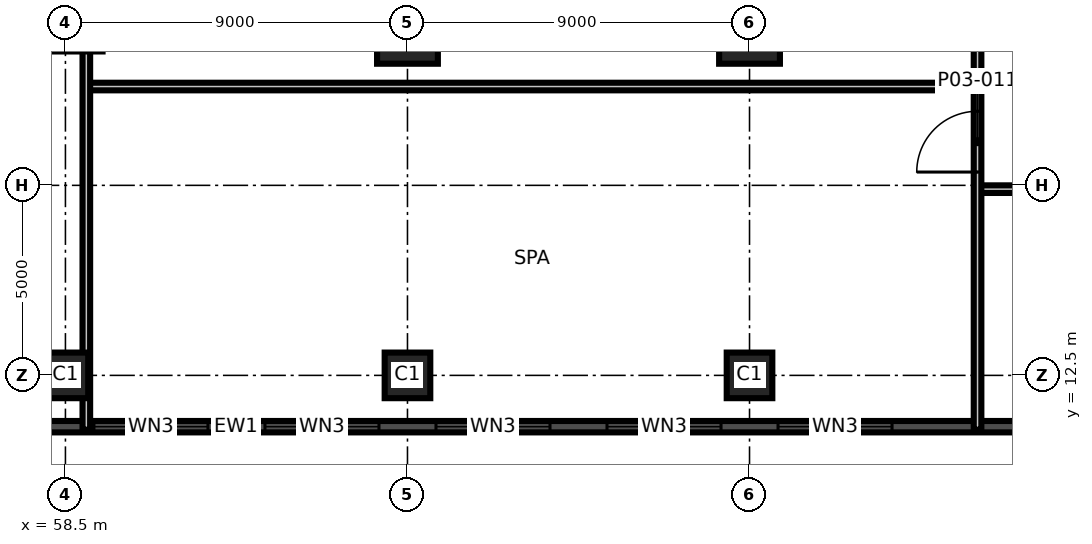
"""IFC4 building model, lengths in metres.
Left out: names, types, materials, properties, quantities, classifications, styles, units other than length and angle.
Written with IfcOpenShell. Run it as: python <this file> out.ifc"""

import sys

from ifc_helpers import new_model, si_unit, direction, frame, frame_2d, origin, origin_2d, place, context, subcontext, project, spatial, rectangle, extrude, element, fill, save


model = new_model("IFC4")
c1 = context("Model", 3, precision=1e-05, world=origin(), true_north=direction((0.0, 1.0)))
c2 = subcontext(c1, "Body", "Model", "MODEL_VIEW")
j1 = project(units=[si_unit("LENGTHUNIT", "METRE"), si_unit("PLANEANGLEUNIT", "RADIAN")], contexts=[c1])
p1 = place(None, origin())
s1 = spatial("IfcSite", under=j1, at=p1, CompositionType="ELEMENT")
p2 = place(p1, origin())
s2 = spatial("IfcBuilding", under=s1, at=p2, CompositionType="ELEMENT")
p3 = place(p2, frame((0.0, 0.0, 18.5)))
s3 = spatial("IfcBuildingStorey", under=s2, at=p3, CompositionType="ELEMENT", Elevation=18.5)
for number, where, z_axis, x_axis in (
    (1, (58.5, 12.5, 0.0), (0.0, 0.0, 1.0), (1.0, 0.0, 0.0)),
    (2, (67.5, 12.5, 0.0), (0.0, 0.0, 1.0), (1.0, 0.0, 0.0)),
    (3, (76.5, 12.5, 0.0), (0.0, 0.0, 1.0), (1.0, 0.0, 0.0)),
):
    element("IfcColumn", number, at=place(p3, frame(where, z_axis=z_axis, x_axis=x_axis)), inside=s3, PredefinedType="COLUMN", context=c2, shape_type="SweptSolid", body=[
        extrude(rectangle(XDim=1.2, YDim=1.2, at=origin_2d()), origin(), (0.0, 0.0, 1.0), 5.0),
    ])
for number, where, z_axis, x_axis in (
    (4, (67.5, 21.5, 0.0), (0.0, 0.0, 1.0), (1.0, 0.0, 0.0)),
    (5, (76.5, 21.5, 0.0), (0.0, 0.0, 1.0), (1.0, 0.0, 0.0)),
):
    element("IfcColumn", number, at=place(p3, frame(where, z_axis=z_axis, x_axis=x_axis)), inside=s3, PredefinedType="COLUMN", context=c2, shape_type="SweptSolid", body=[
        extrude(rectangle(XDim=1.6, YDim=1.6, at=origin_2d()), origin(), (0.0, 0.0, 1.0), 5.0),
    ])
p4 = place(p3, frame((27.048, 11.15, 0.0), z_axis=(0.0, 0.0, 1.0), x_axis=(1.0, 0.0, 0.0)))
e6 = element("IfcWall", 6, at=p4, inside=s3, PredefinedType="SOLIDWALL", context=c2, shape_type="SweptSolid", body=[
    extrude(rectangle(XDim=71.88, YDim=0.3, at=frame_2d((35.94, 0.0))), origin(), (0.0, 0.0, 1.0), 4.7),
])
p5 = place(p4, frame((0.726, 0.0, 0.9)))
e7 = element("IfcOpeningElement", 7, at=p5, cuts=e6, PredefinedType="OPENING", context=c2, shape_type="SweptSolid", body=[
    extrude(rectangle(XDim=3.0, YDim=2.4, at=frame_2d((1.5, 1.2))), frame((0.0, 0.16, 0.0), z_axis=(0.0, -1.0, 0.0), x_axis=(1.0, 0.0, 0.0)), (0.0, 0.0, 1.0), 0.32),
])
p6 = place(p4, frame((5.202, 0.0, 0.9)))
e8 = element("IfcOpeningElement", 8, at=p6, cuts=e6, PredefinedType="OPENING", context=c2, shape_type="SweptSolid", body=[
    extrude(rectangle(XDim=3.0, YDim=2.4, at=frame_2d((1.5, 1.2))), frame((0.0, 0.16, 0.0), z_axis=(0.0, -1.0, 0.0), x_axis=(1.0, 0.0, 0.0)), (0.0, 0.0, 1.0), 0.32),
])
p7 = place(p4, frame((9.702, 0.0, 0.9)))
e9 = element("IfcOpeningElement", 9, at=p7, cuts=e6, PredefinedType="OPENING", context=c2, shape_type="SweptSolid", body=[
    extrude(rectangle(XDim=3.0, YDim=2.4, at=frame_2d((1.5, 1.2))), frame((0.0, 0.16, 0.0), z_axis=(0.0, -1.0, 0.0), x_axis=(1.0, 0.0, 0.0)), (0.0, 0.0, 1.0), 0.32),
])
p8 = place(p4, frame((14.202, 0.0, 0.9)))
e10 = element("IfcOpeningElement", 10, at=p8, cuts=e6, PredefinedType="OPENING", context=c2, shape_type="SweptSolid", body=[
    extrude(rectangle(XDim=3.0, YDim=2.4, at=frame_2d((1.5, 1.2))), frame((0.0, 0.16, 0.0), z_axis=(0.0, -1.0, 0.0), x_axis=(1.0, 0.0, 0.0)), (0.0, 0.0, 1.0), 0.32),
])
p9 = place(p4, frame((18.702, 0.0, 0.9)))
e11 = element("IfcOpeningElement", 11, at=p9, cuts=e6, PredefinedType="OPENING", context=c2, shape_type="SweptSolid", body=[
    extrude(rectangle(XDim=3.0, YDim=2.4, at=frame_2d((1.5, 1.2))), frame((0.0, 0.16, 0.0), z_axis=(0.0, -1.0, 0.0), x_axis=(1.0, 0.0, 0.0)), (0.0, 0.0, 1.0), 0.32),
])
p10 = place(p4, frame((23.202, 0.0, 0.9)))
e12 = element("IfcOpeningElement", 12, at=p10, cuts=e6, PredefinedType="OPENING", context=c2, shape_type="SweptSolid", body=[
    extrude(rectangle(XDim=3.0, YDim=2.4, at=frame_2d((1.5, 1.2))), frame((0.0, 0.16, 0.0), z_axis=(0.0, -1.0, 0.0), x_axis=(1.0, 0.0, 0.0)), (0.0, 0.0, 1.0), 0.32),
])
p11 = place(p4, frame((27.702, 0.0, 0.9)))
e13 = element("IfcOpeningElement", 13, at=p11, cuts=e6, PredefinedType="OPENING", context=c2, shape_type="SweptSolid", body=[
    extrude(rectangle(XDim=3.0, YDim=2.4, at=frame_2d((1.5, 1.2))), frame((0.0, 0.16, 0.0), z_axis=(0.0, -1.0, 0.0), x_axis=(1.0, 0.0, 0.0)), (0.0, 0.0, 1.0), 0.32),
])
p12 = place(p4, frame((32.202, 0.0, 0.9)))
e14 = element("IfcOpeningElement", 14, at=p12, cuts=e6, PredefinedType="OPENING", context=c2, shape_type="SweptSolid", body=[
    extrude(rectangle(XDim=3.0, YDim=2.4, at=frame_2d((1.5, 1.2))), frame((0.0, 0.16, 0.0), z_axis=(0.0, -1.0, 0.0), x_axis=(1.0, 0.0, 0.0)), (0.0, 0.0, 1.0), 0.32),
])
p13 = place(p4, frame((36.702, 0.0, 0.9)))
e15 = element("IfcOpeningElement", 15, at=p13, cuts=e6, PredefinedType="OPENING", context=c2, shape_type="SweptSolid", body=[
    extrude(rectangle(XDim=3.0, YDim=2.4, at=frame_2d((1.5, 1.2))), frame((0.0, 0.16, 0.0), z_axis=(0.0, -1.0, 0.0), x_axis=(1.0, 0.0, 0.0)), (0.0, 0.0, 1.0), 0.32),
])
p14 = place(p4, frame((41.202, 0.0, 0.9)))
e16 = element("IfcOpeningElement", 16, at=p14, cuts=e6, PredefinedType="OPENING", context=c2, shape_type="SweptSolid", body=[
    extrude(rectangle(XDim=3.0, YDim=2.4, at=frame_2d((1.5, 1.2))), frame((0.0, 0.16, 0.0), z_axis=(0.0, -1.0, 0.0), x_axis=(1.0, 0.0, 0.0)), (0.0, 0.0, 1.0), 0.32),
])
p15 = place(p4, frame((45.702, 0.0, 0.9)))
e17 = element("IfcOpeningElement", 17, at=p15, cuts=e6, PredefinedType="OPENING", context=c2, shape_type="SweptSolid", body=[
    extrude(rectangle(XDim=3.0, YDim=2.4, at=frame_2d((1.5, 1.2))), frame((0.0, 0.16, 0.0), z_axis=(0.0, -1.0, 0.0), x_axis=(1.0, 0.0, 0.0)), (0.0, 0.0, 1.0), 0.32),
])
p16 = place(p4, frame((50.202, 0.0, 0.9)))
e18 = element("IfcOpeningElement", 18, at=p16, cuts=e6, PredefinedType="OPENING", context=c2, shape_type="SweptSolid", body=[
    extrude(rectangle(XDim=3.0, YDim=2.4, at=frame_2d((1.5, 1.2))), frame((0.0, 0.16, 0.0), z_axis=(0.0, -1.0, 0.0), x_axis=(1.0, 0.0, 0.0)), (0.0, 0.0, 1.0), 0.32),
])
p17 = place(p4, frame((59.202, 0.0, 0.9)))
e19 = element("IfcOpeningElement", 19, at=p17, cuts=e6, PredefinedType="OPENING", context=c2, shape_type="SweptSolid", body=[
    extrude(rectangle(XDim=3.0, YDim=2.4, at=frame_2d((1.5, 1.2))), frame((0.0, 0.16, 0.0), z_axis=(0.0, -1.0, 0.0), x_axis=(1.0, 0.0, 0.0)), (0.0, 0.0, 1.0), 0.32),
])
p18 = place(p4, frame((63.702, 0.0, 0.9)))
e20 = element("IfcOpeningElement", 20, at=p18, cuts=e6, PredefinedType="OPENING", context=c2, shape_type="SweptSolid", body=[
    extrude(rectangle(XDim=3.0, YDim=2.4, at=frame_2d((1.5, 1.2))), frame((0.0, 0.16, 0.0), z_axis=(0.0, -1.0, 0.0), x_axis=(1.0, 0.0, 0.0)), (0.0, 0.0, 1.0), 0.32),
])
p19 = place(p4, frame((68.226, 0.0, 0.9)))
e21 = element("IfcOpeningElement", 21, at=p19, cuts=e6, PredefinedType="OPENING", context=c2, shape_type="SweptSolid", body=[
    extrude(rectangle(XDim=3.0, YDim=2.4, at=frame_2d((1.5, 1.2))), frame((0.0, 0.16, 0.0), z_axis=(0.0, -1.0, 0.0), x_axis=(1.0, 0.0, 0.0)), (0.0, 0.0, 1.0), 0.32),
])
p20 = place(p3, frame((82.5, 17.4, 0.0), z_axis=(0.0, 0.0, 1.0), x_axis=(1.0, 0.0, 0.0)))
e22 = element("IfcWall", 22, at=p20, inside=s3, PredefinedType="PARTITIONING", context=c2, shape_type="SweptSolid", body=[
    extrude(rectangle(XDim=2.1, YDim=0.2, at=frame_2d((1.05, 0.0))), origin(), (0.0, 0.0, 1.0), 4.7),
])
p21 = place(p3, frame((59.05, 20.1, 0.0), z_axis=(0.0, 0.0, 1.0), x_axis=(1.0, 0.0, 0.0)))
e23 = element("IfcWall", 23, at=p21, inside=s3, PredefinedType="PARTITIONING", context=c2, shape_type="SweptSolid", body=[
    extrude(rectangle(XDim=23.45, YDim=0.2, at=frame_2d((11.725, 0.0))), origin(), (0.0, 0.0, 1.0), 4.7),
])
p22 = place(p3, frame((59.05, 11.07, 0.0), z_axis=(0.0, 0.0, 1.0), x_axis=(0.0, 1.0, 0.0)))
e24 = element("IfcWall", 24, at=p22, inside=s3, PredefinedType="PARTITIONING", context=c2, shape_type="SweptSolid", body=[
    extrude(rectangle(XDim=19.83, YDim=0.2, at=frame_2d((9.915, 0.0))), origin(), (0.0, 0.0, 1.0), 4.7),
])
p23 = place(p3, frame((82.5, 11.07, 0.0), z_axis=(0.0, 0.0, 1.0), x_axis=(0.0, 1.0, 0.0)))
e25 = element("IfcWall", 25, at=p23, inside=s3, PredefinedType="PARTITIONING", context=c2, shape_type="SweptSolid", body=[
    extrude(rectangle(XDim=19.83, YDim=0.2, at=frame_2d((9.915, 0.0))), origin(), (0.0, 0.0, 1.0), 4.7),
])
p24 = place(p23, frame((6.78, 0.0, 0.0)))
e26 = element("IfcOpeningElement", 26, at=p24, cuts=e25, PredefinedType="OPENING", context=c2, shape_type="SweptSolid", body=[
    extrude(rectangle(XDim=1.6, YDim=2.1, at=frame_2d((0.8, 1.05))), frame((0.0, 0.11, 0.0), z_axis=(0.0, -1.0, 0.0), x_axis=(1.0, 0.0, 0.0)), (0.0, 0.0, 1.0), 0.22),
])
p25 = place(p23, frame((11.18, 0.0, 0.0)))
e27 = element("IfcOpeningElement", 27, at=p25, cuts=e25, PredefinedType="OPENING", context=c2, shape_type="SweptSolid", body=[
    extrude(rectangle(XDim=1.0, YDim=2.1, at=frame_2d((0.5, 1.05))), frame((0.0, 0.11, 0.0), z_axis=(0.0, -1.0, 0.0), x_axis=(1.0, 0.0, 0.0)), (0.0, 0.0, 1.0), 0.22),
])
p26 = place(p12, origin())
e28 = element("IfcWindow", 28, at=p26, inside=s3, PartitioningType="SINGLE_PANEL", PredefinedType="WINDOW", context=c2, shape_type="SweptSolid", body=[
    extrude(rectangle(XDim=3.0, YDim=2.4, at=frame_2d((1.5, 1.2))), frame((0.0, 0.03, 0.0), z_axis=(0.0, -1.0, 0.0), x_axis=(1.0, 0.0, 0.0)), (0.0, 0.0, 1.0), 0.06),
])
fill(e14, e28)
p27 = place(p13, origin())
e29 = element("IfcWindow", 29, at=p27, inside=s3, PartitioningType="SINGLE_PANEL", PredefinedType="WINDOW", context=c2, shape_type="SweptSolid", body=[
    extrude(rectangle(XDim=3.0, YDim=2.4, at=frame_2d((1.5, 1.2))), frame((0.0, 0.03, 0.0), z_axis=(0.0, -1.0, 0.0), x_axis=(1.0, 0.0, 0.0)), (0.0, 0.0, 1.0), 0.06),
])
fill(e15, e29)
p28 = place(p14, origin())
e30 = element("IfcWindow", 30, at=p28, inside=s3, PartitioningType="SINGLE_PANEL", PredefinedType="WINDOW", context=c2, shape_type="SweptSolid", body=[
    extrude(rectangle(XDim=3.0, YDim=2.4, at=frame_2d((1.5, 1.2))), frame((0.0, 0.03, 0.0), z_axis=(0.0, -1.0, 0.0), x_axis=(1.0, 0.0, 0.0)), (0.0, 0.0, 1.0), 0.06),
])
fill(e16, e30)
p29 = place(p15, origin())
e31 = element("IfcWindow", 31, at=p29, inside=s3, PartitioningType="SINGLE_PANEL", PredefinedType="WINDOW", context=c2, shape_type="SweptSolid", body=[
    extrude(rectangle(XDim=3.0, YDim=2.4, at=frame_2d((1.5, 1.2))), frame((0.0, 0.03, 0.0), z_axis=(0.0, -1.0, 0.0), x_axis=(1.0, 0.0, 0.0)), (0.0, 0.0, 1.0), 0.06),
])
fill(e17, e31)
p30 = place(p16, origin())
e32 = element("IfcWindow", 32, at=p30, inside=s3, PartitioningType="SINGLE_PANEL", PredefinedType="WINDOW", context=c2, shape_type="SweptSolid", body=[
    extrude(rectangle(XDim=3.0, YDim=2.4, at=frame_2d((1.5, 1.2))), frame((0.0, 0.03, 0.0), z_axis=(0.0, -1.0, 0.0), x_axis=(1.0, 0.0, 0.0)), (0.0, 0.0, 1.0), 0.06),
])
fill(e18, e32)
p31 = place(p24, origin())
e33 = element("IfcDoor", 33, at=p31, inside=s3, OperationType="SINGLE_SWING_LEFT", PredefinedType="DOOR", context=c2, shape_type="SweptSolid", body=[
    extrude(rectangle(XDim=1.6, YDim=2.1, at=frame_2d((0.8, 1.05))), frame((0.0, 0.025, 0.0), z_axis=(0.0, -1.0, 0.0), x_axis=(1.0, 0.0, 0.0)), (0.0, 0.0, 1.0), 0.05),
])
fill(e26, e33)
save(model, sys.argv[1])
